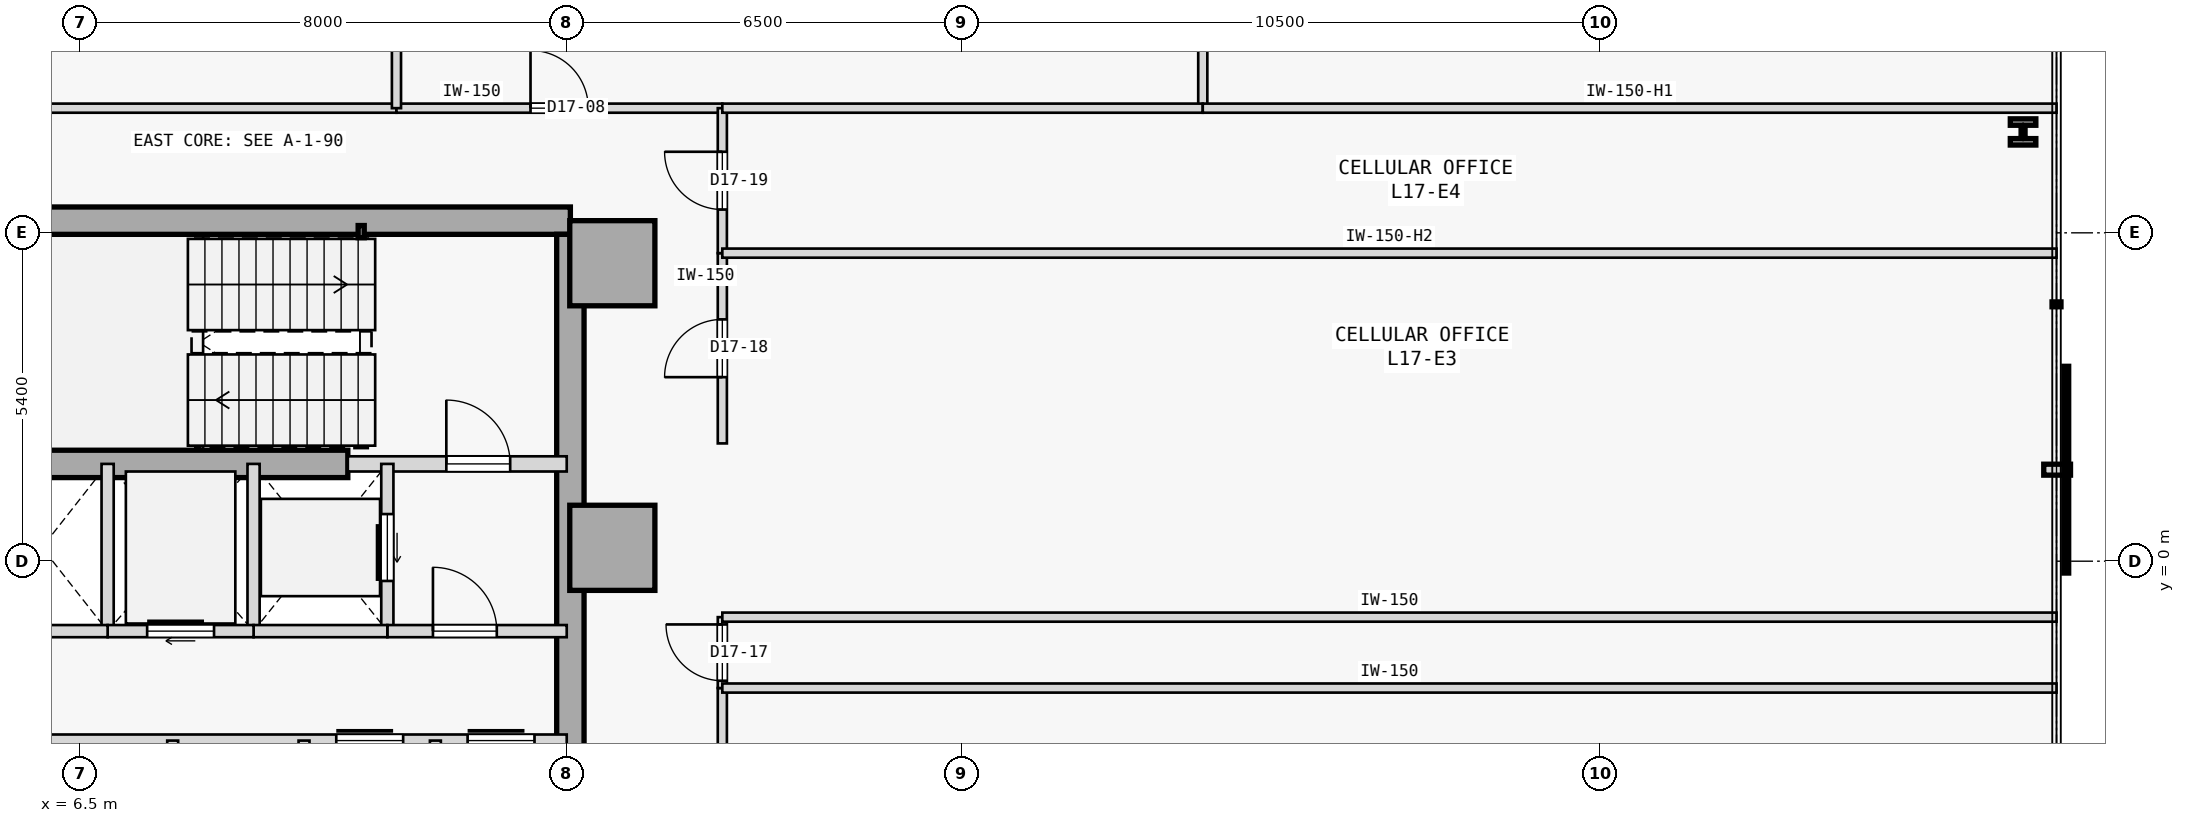
"""IFC4 building model, lengths in metres.
Left out: names, types, materials, properties, quantities, classifications, styles, units other than length and angle.
Written with IfcOpenShell. Run it as: python <this file> out.ifc"""

import sys

from ifc_helpers import new_model, si_unit, direction, frame, frame_2d, origin, origin_2d, place, context, subcontext, project, spatial, rectangle, hollow_rectangle, i_section, extrude, element, fill, save


model = new_model("IFC4")
c1 = context("Model", 3, precision=1e-05, world=origin(), true_north=direction((0.0, 1.0)))
c2 = subcontext(c1, "Body", "Model", "MODEL_VIEW")
j1 = project(units=[si_unit("LENGTHUNIT", "METRE"), si_unit("PLANEANGLEUNIT", "RADIAN")], contexts=[c1])
p1 = place(None, origin())
s1 = spatial("IfcSite", under=j1, at=p1, CompositionType="ELEMENT")
p2 = place(p1, origin())
s2 = spatial("IfcBuilding", under=s1, at=p2, CompositionType="ELEMENT")
p3 = place(p2, frame((0.0, 0.0, 71.2)))
s3 = spatial("IfcBuildingStorey", under=s2, at=p3, CompositionType="ELEMENT", Elevation=71.2)
for number, where, z_axis, x_axis in (
    (1, (15.25, 4.9, 0.0), (0.0, 0.0, 1.0), (1.0, 0.0, 0.0)),
    (2, (15.25, 0.22, 0.0), (0.0, 0.0, 1.0), (1.0, 0.0, 0.0)),
):
    element("IfcColumn", number, at=place(p3, frame(where, z_axis=z_axis, x_axis=x_axis)), inside=s3, PredefinedType="COLUMN", context=c2, shape_type="SweptSolid", body=[
        extrude(rectangle(XDim=1.4, YDim=1.4, at=origin_2d()), origin(), (0.0, 0.0, 1.0), 3.8),
    ])
p4 = place(p3, frame((3.15, 5.6, 0.0), z_axis=(0.0, 0.0, 1.0), x_axis=(1.0, 0.0, 0.0)))
e3 = element("IfcWall", 3, at=p4, inside=s3, PredefinedType="SHEAR", context=c2, shape_type="SweptSolid", body=[
    extrude(rectangle(XDim=11.41, YDim=0.45, at=frame_2d((5.705, 0.0))), origin(), (0.0, 0.0, 1.0), 3.575),
])
p5 = place(p3, frame((14.56, -5.375, 0.0), z_axis=(0.0, 0.0, 1.0), x_axis=(0.0, 1.0, 0.0)))
e4 = element("IfcWall", 4, at=p5, inside=s3, PredefinedType="SHEAR", context=c2, shape_type="SweptSolid", body=[
    extrude(rectangle(XDim=10.75, YDim=0.45, at=frame_2d((5.375, 0.0))), origin(), (0.0, 0.0, 1.0), 3.575),
])
p6 = place(p3, frame((5.75, 1.6, 0.0), z_axis=(0.0, 0.0, 1.0), x_axis=(1.0, 0.0, 0.0)))
e5 = element("IfcWall", 5, at=p6, inside=s3, PredefinedType="SHEAR", context=c2, shape_type="SweptSolid", body=[
    extrude(rectangle(XDim=5.15, YDim=0.45, at=frame_2d((2.575, 0.0))), origin(), (0.0, 0.0, 1.0), 3.575),
])
p7 = place(p3, frame((11.12, 5.42, 0.0), z_axis=(0.0, 0.0, 1.0), x_axis=(1.0, 0.0, 0.0)))
e6 = element("IfcColumn", 6, at=p7, inside=s3, PredefinedType="COLUMN", context=c2, shape_type="SweptSolid", body=[
    extrude(hollow_rectangle(XDim=0.1, YDim=0.2, WallThickness=0.008, at=origin_2d()), origin(), (0.0, 0.0, 1.0), 3.8),
])
p8 = place(p3, frame((38.45, 7.059, 0.0), z_axis=(0.0, 0.0, 1.0), x_axis=(1.0, 0.0, 0.0)))
e7 = element("IfcColumn", 7, at=p8, inside=s3, PredefinedType="COLUMN", context=c2, shape_type="SweptSolid", body=[
    extrude(i_section(OverallWidth=0.42, OverallDepth=0.431, WebThickness=0.065, FlangeThickness=0.106, FilletRadius=0.015, at=origin_2d()), origin(), (0.0, 0.0, 1.0), 3.8),
])
p9 = place(p3, frame((10.9, 1.6, 0.0), z_axis=(0.0, 0.0, 1.0), x_axis=(1.0, 0.0, 0.0)))
e8 = element("IfcWall", 8, at=p9, inside=s3, PredefinedType="STANDARD", context=c2, shape_type="SweptSolid", body=[
    extrude(rectangle(XDim=3.6, YDim=0.25, at=frame_2d((1.8, 0.0))), origin(), (0.0, 0.0, 1.0), 3.575),
])
p10 = place(p9, frame((1.62, 0.0, 0.0)))
e9 = element("IfcOpeningElement", 9, at=p10, cuts=e8, PredefinedType="OPENING", context=c2, shape_type="SweptSolid", body=[
    extrude(rectangle(XDim=1.05, YDim=2.15, at=frame_2d((0.525, 1.075))), frame((0.0, 0.135, 0.0), z_axis=(0.0, -1.0, 0.0), x_axis=(1.0, 0.0, 0.0)), (0.0, 0.0, 1.0), 0.27),
])
p11 = place(p3, frame((11.55, -1.15, 0.0), z_axis=(0.0, 0.0, 1.0), x_axis=(0.0, 1.0, 0.0)))
e10 = element("IfcWall", 10, at=p11, inside=s3, PredefinedType="STANDARD", context=c2, shape_type="SweptSolid", body=[
    extrude(rectangle(XDim=2.75, YDim=0.2, at=frame_2d((1.375, 0.0))), origin(), (0.0, 0.0, 1.0), 3.575),
])
p12 = place(p11, frame((0.825, 0.0, 0.0)))
e11 = element("IfcOpeningElement", 11, at=p12, cuts=e10, PredefinedType="OPENING", context=c2, shape_type="SweptSolid", body=[
    extrude(rectangle(XDim=1.1, YDim=2.15, at=frame_2d((0.55, 1.075))), frame((0.0, 0.11, 0.0), z_axis=(0.0, -1.0, 0.0), x_axis=(1.0, 0.0, 0.0)), (0.0, 0.0, 1.0), 0.22),
])
p13 = place(p3, frame((9.35, -1.15, 0.0), z_axis=(0.0, 0.0, 1.0), x_axis=(0.0, 1.0, 0.0)))
e12 = element("IfcWall", 12, at=p13, inside=s3, PredefinedType="STANDARD", context=c2, shape_type="SweptSolid", body=[
    extrude(rectangle(XDim=2.75, YDim=0.2, at=frame_2d((1.375, 0.0))), origin(), (0.0, 0.0, 1.0), 3.575),
])
p14 = place(p3, frame((11.55, -1.15, 0.0), z_axis=(0.0, 0.0, 1.0), x_axis=(1.0, 0.0, 0.0)))
e13 = element("IfcWall", 13, at=p14, inside=s3, PredefinedType="STANDARD", context=c2, shape_type="SweptSolid", body=[
    extrude(rectangle(XDim=2.95, YDim=0.2, at=frame_2d((1.475, 0.0))), origin(), (0.0, 0.0, 1.0), 3.575),
])
p15 = place(p14, frame((0.75, 0.0, 0.0)))
e14 = element("IfcOpeningElement", 14, at=p15, cuts=e13, PredefinedType="OPENING", context=c2, shape_type="SweptSolid", body=[
    extrude(rectangle(XDim=1.05, YDim=2.18, at=frame_2d((0.525, 1.09))), frame((0.0, 0.11, 0.0), z_axis=(0.0, -1.0, 0.0), x_axis=(1.0, 0.0, 0.0)), (0.0, 0.0, 1.0), 0.22),
])
p16 = place(p3, frame((9.35, -1.15, 0.0), z_axis=(0.0, 0.0, 1.0), x_axis=(1.0, 0.0, 0.0)))
e15 = element("IfcWall", 15, at=p16, inside=s3, PredefinedType="STANDARD", context=c2, shape_type="SweptSolid", body=[
    extrude(rectangle(XDim=2.2, YDim=0.2, at=frame_2d((1.1, 0.0))), origin(), (0.0, 0.0, 1.0), 3.575),
])
p17 = place(p3, frame((6.95, -1.15, 0.0), z_axis=(0.0, 0.0, 1.0), x_axis=(0.0, 1.0, 0.0)))
e16 = element("IfcWall", 16, at=p17, inside=s3, PredefinedType="STANDARD", context=c2, shape_type="SweptSolid", body=[
    extrude(rectangle(XDim=2.75, YDim=0.2, at=frame_2d((1.375, 0.0))), origin(), (0.0, 0.0, 1.0), 3.575),
])
p18 = place(p3, frame((6.95, -1.15, 0.0), z_axis=(0.0, 0.0, 1.0), x_axis=(1.0, 0.0, 0.0)))
e17 = element("IfcWall", 17, at=p18, inside=s3, PredefinedType="STANDARD", context=c2, shape_type="SweptSolid", body=[
    extrude(rectangle(XDim=2.4, YDim=0.2, at=frame_2d((1.2, 0.0))), origin(), (0.0, 0.0, 1.0), 3.575),
])
p19 = place(p18, frame((0.65, 0.0, 0.0)))
e18 = element("IfcOpeningElement", 18, at=p19, cuts=e17, PredefinedType="OPENING", context=c2, shape_type="SweptSolid", body=[
    extrude(rectangle(XDim=1.1, YDim=2.15, at=frame_2d((0.55, 1.075))), frame((0.0, 0.11, 0.0), z_axis=(0.0, -1.0, 0.0), x_axis=(1.0, 0.0, 0.0)), (0.0, 0.0, 1.0), 0.22),
])
p20 = place(p3, frame((4.79, -1.15, 0.0), z_axis=(0.0, 0.0, 1.0), x_axis=(1.0, 0.0, 0.0)))
e19 = element("IfcWall", 19, at=p20, inside=s3, PredefinedType="STANDARD", context=c2, shape_type="SweptSolid", body=[
    extrude(rectangle(XDim=2.16, YDim=0.2, at=frame_2d((1.08, 0.0))), origin(), (0.0, 0.0, 1.0), 3.575),
])
p21 = place(p3, frame((3.7, -2.95, 0.0), z_axis=(0.0, 0.0, 1.0), x_axis=(1.0, 0.0, 0.0)))
e20 = element("IfcWall", 20, at=p21, inside=s3, PredefinedType="STANDARD", context=c2, shape_type="SweptSolid", body=[
    extrude(rectangle(XDim=10.8, YDim=0.2, at=frame_2d((5.4, 0.0))), origin(), (0.0, 0.0, 1.0), 3.575),
])
p22 = place(p21, frame((7.01, 0.0, 0.0)))
e21 = element("IfcOpeningElement", 21, at=p22, cuts=e20, PredefinedType="OPENING", context=c2, shape_type="SweptSolid", body=[
    extrude(rectangle(XDim=1.1, YDim=2.15, at=frame_2d((0.55, 1.075))), frame((0.0, 0.11, 0.0), z_axis=(0.0, -1.0, 0.0), x_axis=(1.0, 0.0, 0.0)), (0.0, 0.0, 1.0), 0.22),
])
p23 = place(p21, frame((9.17, 0.0, 0.0)))
e22 = element("IfcOpeningElement", 22, at=p23, cuts=e20, PredefinedType="OPENING", context=c2, shape_type="SweptSolid", body=[
    extrude(rectangle(XDim=1.1, YDim=2.15, at=frame_2d((0.55, 1.075))), frame((0.0, 0.11, 0.0), z_axis=(0.0, -1.0, 0.0), x_axis=(1.0, 0.0, 0.0)), (0.0, 0.0, 1.0), 0.22),
])
for number, where, z_axis, x_axis in (
    (23, (12.34, -5.6, 0.0), (0.0, 0.0, 1.0), (0.0, 1.0, 0.0)),
    (24, (10.18, -5.6, 0.0), (0.0, 0.0, 1.0), (0.0, 1.0, 0.0)),
    (25, (8.02, -5.6, 0.0), (0.0, 0.0, 1.0), (0.0, 1.0, 0.0)),
):
    element("IfcWall", number, at=place(p3, frame(where, z_axis=z_axis, x_axis=x_axis)), inside=s3, PredefinedType="STANDARD", context=c2, shape_type="SweptSolid", body=[
        extrude(rectangle(XDim=2.65, YDim=0.18, at=frame_2d((1.325, 0.0))), origin(), (0.0, 0.0, 1.0), 3.575),
    ])
p24 = place(p3, frame((0.92, 7.45, 0.0), z_axis=(0.0, 0.0, 1.0), x_axis=(1.0, 0.0, 0.0)))
e26 = element("IfcWall", 26, at=p24, inside=s3, PredefinedType="PARTITIONING", context=c2, shape_type="SweptSolid", body=[
    extrude(rectangle(XDim=10.78, YDim=0.15, at=frame_2d((5.39, 0.0))), origin(), (0.0, 0.0, 1.0), 3.575),
])
p25 = place(p3, frame((11.7, 7.45, 0.0), z_axis=(0.0, 0.0, 1.0), x_axis=(1.0, 0.0, 0.0)))
e27 = element("IfcWall", 27, at=p25, inside=s3, PredefinedType="PARTITIONING", context=c2, shape_type="SweptSolid", body=[
    extrude(rectangle(XDim=5.359, YDim=0.15, at=frame_2d((2.68, 0.0))), origin(), (0.0, 0.0, 1.0), 3.575),
])
p26 = place(p25, frame((2.205, 0.0, 0.0)))
e28 = element("IfcOpeningElement", 28, at=p26, cuts=e27, PredefinedType="OPENING", context=c2, shape_type="SweptSolid", body=[
    extrude(rectangle(XDim=0.95, YDim=2.15, at=frame_2d((0.475, 1.075))), frame((0.0, 0.085, 0.0), z_axis=(0.0, -1.0, 0.0), x_axis=(1.0, 0.0, 0.0)), (0.0, 0.0, 1.0), 0.17),
])
p27 = place(p3, frame((17.059, -7.45, 0.0), z_axis=(0.0, 0.0, 1.0), x_axis=(0.0, 1.0, 0.0)))
e29 = element("IfcWall", 29, at=p27, inside=s3, PredefinedType="PARTITIONING", context=c2, shape_type="SweptSolid", body=[
    extrude(rectangle(XDim=5.364, YDim=0.15, at=frame_2d((2.682, 0.0))), origin(), (0.0, 0.0, 1.0), 3.575),
])
p28 = place(p27, frame((0.705, 0.0, 0.0)))
e30 = element("IfcOpeningElement", 30, at=p28, cuts=e29, PredefinedType="OPENING", context=c2, shape_type="SweptSolid", body=[
    extrude(rectangle(XDim=0.95, YDim=2.15, at=frame_2d((0.475, 1.075))), frame((0.0, 0.085, 0.0), z_axis=(0.0, -1.0, 0.0), x_axis=(1.0, 0.0, 0.0)), (0.0, 0.0, 1.0), 0.17),
])
p29 = place(p3, frame((17.059, -2.086, 0.0), z_axis=(0.0, 0.0, 1.0), x_axis=(0.0, 1.0, 0.0)))
e31 = element("IfcWall", 31, at=p29, inside=s3, PredefinedType="PARTITIONING", context=c2, shape_type="SweptSolid", body=[
    extrude(rectangle(XDim=1.166, YDim=0.15, at=frame_2d((0.583, 0.0))), origin(), (0.0, 0.0, 1.0), 3.575),
])
p30 = place(p29, frame((0.12, 0.0, 0.0)))
e32 = element("IfcOpeningElement", 32, at=p30, cuts=e31, PredefinedType="OPENING", context=c2, shape_type="SweptSolid", body=[
    extrude(rectangle(XDim=0.926, YDim=2.15, at=frame_2d((0.463, 1.075))), frame((0.0, 0.085, 0.0), z_axis=(0.0, -1.0, 0.0), x_axis=(1.0, 0.0, 0.0)), (0.0, 0.0, 1.0), 0.17),
])
p31 = place(p3, frame((17.059, -0.92, 0.0), z_axis=(0.0, 0.0, 1.0), x_axis=(1.0, 0.0, 0.0)))
e33 = element("IfcWall", 33, at=p31, inside=s3, PredefinedType="PARTITIONING", context=c2, shape_type="SweptSolid", body=[
    extrude(rectangle(XDim=21.941, YDim=0.15, at=frame_2d((10.97, 0.0))), origin(), (0.0, 0.0, 1.0), 3.575),
])
p32 = place(p3, frame((17.059, 1.937, 0.0), z_axis=(0.0, 0.0, 1.0), x_axis=(0.0, 1.0, 0.0)))
e34 = element("IfcWall", 34, at=p32, inside=s3, PredefinedType="PARTITIONING", context=c2, shape_type="SweptSolid", body=[
    extrude(rectangle(XDim=3.129, YDim=0.15, at=frame_2d((1.564, 0.0))), origin(), (0.0, 0.0, 1.0), 3.575),
])
p33 = place(p32, frame((1.09, 0.0, 0.0)))
e35 = element("IfcOpeningElement", 35, at=p33, cuts=e34, PredefinedType="OPENING", context=c2, shape_type="SweptSolid", body=[
    extrude(rectangle(XDim=0.95, YDim=2.15, at=frame_2d((0.475, 1.075))), frame((0.0, 0.085, 0.0), z_axis=(0.0, -1.0, 0.0), x_axis=(1.0, 0.0, 0.0)), (0.0, 0.0, 1.0), 0.17),
])
p34 = place(p3, frame((17.059, 5.066, 0.0), z_axis=(0.0, 0.0, 1.0), x_axis=(0.0, 1.0, 0.0)))
e36 = element("IfcWall", 36, at=p34, inside=s3, PredefinedType="PARTITIONING", context=c2, shape_type="SweptSolid", body=[
    extrude(rectangle(XDim=2.384, YDim=0.15, at=frame_2d((1.192, 0.0))), origin(), (0.0, 0.0, 1.0), 3.575),
])
p35 = place(p34, frame((0.717, 0.0, 0.0)))
e37 = element("IfcOpeningElement", 37, at=p35, cuts=e36, PredefinedType="OPENING", context=c2, shape_type="SweptSolid", body=[
    extrude(rectangle(XDim=0.95, YDim=2.15, at=frame_2d((0.475, 1.075))), frame((0.0, 0.085, 0.0), z_axis=(0.0, -1.0, 0.0), x_axis=(1.0, 0.0, 0.0)), (0.0, 0.0, 1.0), 0.17),
])
p36 = place(p3, frame((11.7, 7.45, 0.0), z_axis=(0.0, 0.0, 1.0), x_axis=(0.0, 1.0, 0.0)))
e38 = element("IfcWall", 38, at=p36, inside=s3, PredefinedType="PARTITIONING", context=c2, shape_type="SweptSolid", body=[
    extrude(rectangle(XDim=17.55, YDim=0.15, at=frame_2d((8.775, 0.0))), origin(), (0.0, 0.0, 1.0), 3.575),
])
p37 = place(p3, frame((24.96, 7.45, 0.0), z_axis=(0.0, 0.0, 1.0), x_axis=(0.0, 1.0, 0.0)))
e39 = element("IfcWall", 39, at=p37, inside=s3, PredefinedType="PARTITIONING", context=c2, shape_type="SweptSolid", body=[
    extrude(rectangle(XDim=17.55, YDim=0.15, at=frame_2d((8.775, 0.0))), origin(), (0.0, 0.0, 1.0), 3.575),
])
p38 = place(p37, frame((8.3, 0.0, 0.0)))
e40 = element("IfcOpeningElement", 40, at=p38, cuts=e39, PredefinedType="OPENING", context=c2, shape_type="SweptSolid", body=[
    extrude(rectangle(XDim=0.95, YDim=2.15, at=frame_2d((0.475, 1.075))), frame((0.0, 0.085, 0.0), z_axis=(0.0, -1.0, 0.0), x_axis=(1.0, 0.0, 0.0)), (0.0, 0.0, 1.0), 0.17),
])
p39 = place(p3, frame((17.059, 7.45, 0.0), z_axis=(0.0, 0.0, 1.0), x_axis=(1.0, 0.0, 0.0)))
e41 = element("IfcWall", 41, at=p39, inside=s3, PredefinedType="PARTITIONING", context=c2, shape_type="SweptSolid", body=[
    extrude(rectangle(XDim=7.901, YDim=0.15, at=frame_2d((3.95, 0.0))), origin(), (0.0, 0.0, 1.0), 3.575),
])
p40 = place(p3, frame((24.96, 7.45, 0.0), z_axis=(0.0, 0.0, 1.0), x_axis=(1.0, 0.0, 0.0)))
e42 = element("IfcWall", 42, at=p40, inside=s3, PredefinedType="PARTITIONING", context=c2, shape_type="SweptSolid", body=[
    extrude(rectangle(XDim=14.04, YDim=0.15, at=frame_2d((7.02, 0.0))), origin(), (0.0, 0.0, 1.0), 3.125),
])
p41 = place(p3, frame((17.059, -2.086, 0.0), z_axis=(0.0, 0.0, 1.0), x_axis=(1.0, 0.0, 0.0)))
e43 = element("IfcWall", 43, at=p41, inside=s3, PredefinedType="PARTITIONING", context=c2, shape_type="SweptSolid", body=[
    extrude(rectangle(XDim=21.941, YDim=0.15, at=frame_2d((10.97, 0.0))), origin(), (0.0, 0.0, 1.0), 3.575),
])
p42 = place(p3, frame((17.059, 5.066, 0.0), z_axis=(0.0, 0.0, 1.0), x_axis=(1.0, 0.0, 0.0)))
e44 = element("IfcWall", 44, at=p42, inside=s3, PredefinedType="PARTITIONING", context=c2, shape_type="SweptSolid", body=[
    extrude(rectangle(XDim=21.941, YDim=0.15, at=frame_2d((10.97, 0.0))), origin(), (0.0, 0.0, 1.0), 2.975),
])
p43 = place(p10, origin())
e45 = element("IfcDoor", 45, at=p43, inside=s3, OperationType="SINGLE_SWING_LEFT", PredefinedType="DOOR", context=c2, shape_type="SweptSolid", body=[
    extrude(rectangle(XDim=1.05, YDim=2.15, at=frame_2d((0.525, 1.075))), frame((0.0, 0.025, 0.0), z_axis=(0.0, -1.0, 0.0), x_axis=(1.0, 0.0, 0.0)), (0.0, 0.0, 1.0), 0.05),
])
fill(e9, e45)
p44 = place(p15, origin())
e46 = element("IfcDoor", 46, at=p44, inside=s3, OperationType="SINGLE_SWING_LEFT", PredefinedType="DOOR", context=c2, shape_type="SweptSolid", body=[
    extrude(rectangle(XDim=1.05, YDim=2.18, at=frame_2d((0.525, 1.09))), frame((0.0, 0.025, 0.0), z_axis=(0.0, -1.0, 0.0), x_axis=(1.0, 0.0, 0.0)), (0.0, 0.0, 1.0), 0.05),
])
fill(e14, e46)
p45 = place(p12, origin())
e47 = element("IfcDoor", 47, at=p45, inside=s3, OperationType="SLIDING_TO_RIGHT", PredefinedType="DOOR", context=c2, shape_type="SweptSolid", body=[
    extrude(rectangle(XDim=1.1, YDim=2.15, at=frame_2d((0.55, 1.075))), frame((0.0, 0.025, 0.0), z_axis=(0.0, -1.0, 0.0), x_axis=(1.0, 0.0, 0.0)), (0.0, 0.0, 1.0), 0.05),
])
fill(e11, e47)
p46 = place(p19, origin())
e48 = element("IfcDoor", 48, at=p46, inside=s3, OperationType="SLIDING_TO_RIGHT", PredefinedType="DOOR", context=c2, shape_type="SweptSolid", body=[
    extrude(rectangle(XDim=1.1, YDim=2.15, at=frame_2d((0.55, 1.075))), frame((0.0, 0.025, 0.0), z_axis=(0.0, -1.0, 0.0), x_axis=(1.0, 0.0, 0.0)), (0.0, 0.0, 1.0), 0.05),
])
fill(e18, e48)
p47 = place(p22, origin())
e49 = element("IfcDoor", 49, at=p47, inside=s3, OperationType="SLIDING_TO_RIGHT", PredefinedType="DOOR", context=c2, shape_type="SweptSolid", body=[
    extrude(rectangle(XDim=1.1, YDim=2.15, at=frame_2d((0.55, 1.075))), frame((0.0, 0.025, 0.0), z_axis=(0.0, -1.0, 0.0), x_axis=(1.0, 0.0, 0.0)), (0.0, 0.0, 1.0), 0.05),
])
fill(e21, e49)
p48 = place(p23, origin())
e50 = element("IfcDoor", 50, at=p48, inside=s3, OperationType="SLIDING_TO_LEFT", PredefinedType="DOOR", context=c2, shape_type="SweptSolid", body=[
    extrude(rectangle(XDim=1.1, YDim=2.15, at=frame_2d((0.55, 1.075))), frame((0.0, 0.025, 0.0), z_axis=(0.0, -1.0, 0.0), x_axis=(1.0, 0.0, 0.0)), (0.0, 0.0, 1.0), 0.05),
])
fill(e22, e50)
p49 = place(p26, origin())
e51 = element("IfcDoor", 51, at=p49, inside=s3, OperationType="SINGLE_SWING_LEFT", PredefinedType="DOOR", context=c2, shape_type="SweptSolid", body=[
    extrude(rectangle(XDim=0.95, YDim=2.15, at=frame_2d((0.475, 1.075))), frame((0.0, 0.025, 0.0), z_axis=(0.0, -1.0, 0.0), x_axis=(1.0, 0.0, 0.0)), (0.0, 0.0, 1.0), 0.05),
])
fill(e28, e51)
p50 = place(p30, origin())
e52 = element("IfcDoor", 52, at=p50, inside=s3, OperationType="SINGLE_SWING_RIGHT", PredefinedType="DOOR", context=c2, shape_type="SweptSolid", body=[
    extrude(rectangle(XDim=0.926, YDim=2.15, at=frame_2d((0.463, 1.075))), frame((0.0, 0.025, 0.0), z_axis=(0.0, -1.0, 0.0), x_axis=(1.0, 0.0, 0.0)), (0.0, 0.0, 1.0), 0.05),
])
fill(e32, e52)
p51 = place(p33, origin())
e53 = element("IfcDoor", 53, at=p51, inside=s3, OperationType="SINGLE_SWING_LEFT", PredefinedType="DOOR", context=c2, shape_type="SweptSolid", body=[
    extrude(rectangle(XDim=0.95, YDim=2.15, at=frame_2d((0.475, 1.075))), frame((0.0, 0.025, 0.0), z_axis=(0.0, -1.0, 0.0), x_axis=(1.0, 0.0, 0.0)), (0.0, 0.0, 1.0), 0.05),
])
fill(e35, e53)
p52 = place(p35, origin())
e54 = element("IfcDoor", 54, at=p52, inside=s3, OperationType="SINGLE_SWING_RIGHT", PredefinedType="DOOR", context=c2, shape_type="SweptSolid", body=[
    extrude(rectangle(XDim=0.95, YDim=2.15, at=frame_2d((0.475, 1.075))), frame((0.0, 0.025, 0.0), z_axis=(0.0, -1.0, 0.0), x_axis=(1.0, 0.0, 0.0)), (0.0, 0.0, 1.0), 0.05),
])
fill(e37, e54)
save(model, sys.argv[1])
